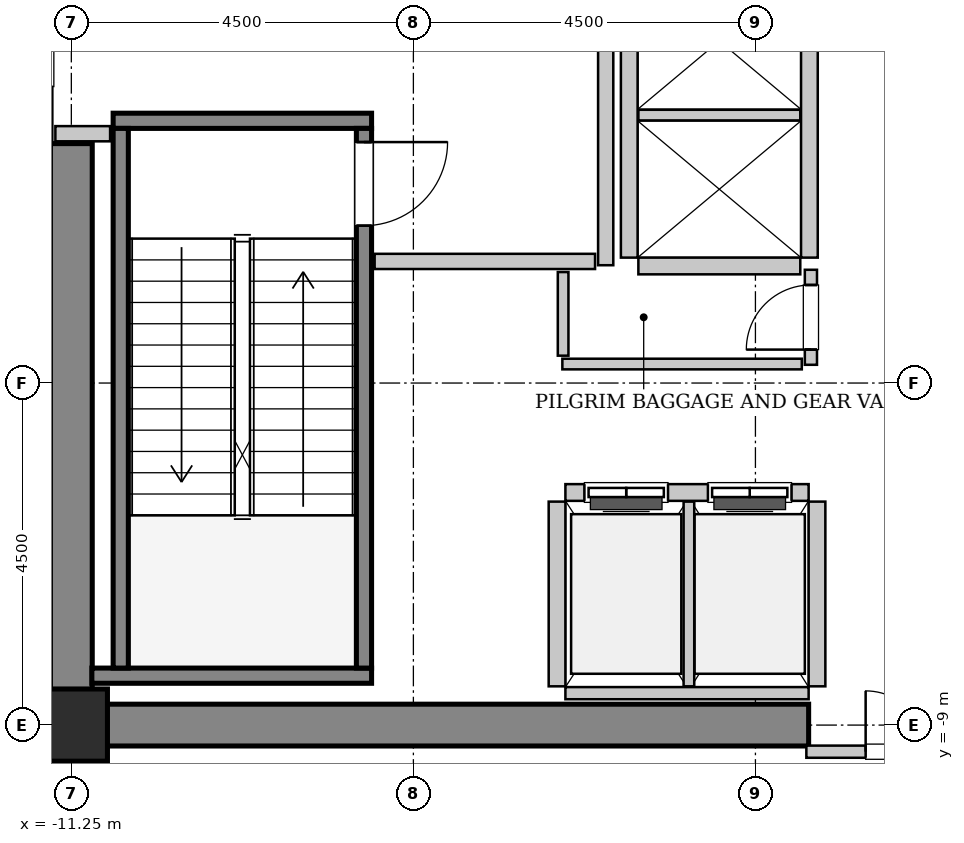
"""IFC4 building model, lengths in metres.
Left out: names, types, materials, properties, quantities, classifications, styles, units other than length and angle.
Written with IfcOpenShell. Run it as: python <this file> out.ifc"""

import sys

from ifc_helpers import new_model, si_unit, direction, frame, frame_2d, origin, origin_2d, place, context, subcontext, project, spatial, rectangle, hollow_rectangle, extrude, source, transform, mapped, element, fill, save


model = new_model("IFC4")
c1 = context("Model", 3, precision=1e-05, world=origin(), true_north=direction((0.0, 1.0)))
c2 = subcontext(c1, "Body", "Model", "MODEL_VIEW")
j1 = project(units=[si_unit("LENGTHUNIT", "METRE"), si_unit("PLANEANGLEUNIT", "RADIAN")], contexts=[c1])
p1 = place(None, origin())
s1 = spatial("IfcSite", under=j1, at=p1, CompositionType="ELEMENT")
p2 = place(p1, origin())
s2 = spatial("IfcBuilding", under=s1, at=p2, CompositionType="ELEMENT")
p3 = place(p2, frame((0.0, 0.0, 144.0)))
s3 = spatial("IfcBuildingStorey", under=s2, at=p3, CompositionType="ELEMENT", Elevation=144.0)
m1 = source(origin(), c2, "Body", "SweptSolid", [
    extrude(rectangle(XDim=9.975, YDim=0.55, at=frame_2d((4.987, 0.0))), origin(), (0.0, 0.0, 1.0), 4.8),
])
p4 = place(p3, frame((-11.525, -9.0, 0.0), z_axis=(0.0, 0.0, 1.0), x_axis=(1.0, 0.0, 0.0)))
e1 = element("IfcWall", 1, at=p4, inside=s3, PredefinedType="SHEAR", context=c2, shape_type="MappedRepresentation", body=[
    mapped(m1, transform((0.0, 0.0, 0.0), x_axis=(1.0, 0.0, 0.0), y_axis=(0.0, 1.0, 0.0), z_axis=(0.0, 0.0, 1.0), scale=1.0)),
])
m2 = source(origin(), c2, "Body", "SweptSolid", [
    extrude(rectangle(XDim=7.375, YDim=0.55, at=frame_2d((3.688, 0.0))), origin(), (0.0, 0.0, 1.0), 4.8),
])
p5 = place(p3, frame((-11.25, -8.725, 0.0), z_axis=(0.0, 0.0, 1.0), x_axis=(0.0, 1.0, 0.0)))
e2 = element("IfcWall", 2, at=p5, inside=s3, PredefinedType="SHEAR", context=c2, shape_type="MappedRepresentation", body=[
    mapped(m2, transform((0.0, 0.0, 0.0), x_axis=(1.0, 0.0, 0.0), y_axis=(0.0, 1.0, 0.0), z_axis=(0.0, 0.0, 1.0), scale=1.0)),
])
m3 = source(origin(), c2, "Body", "SweptSolid", [
    extrude(hollow_rectangle(XDim=0.95, YDim=0.95, WallThickness=0.045, InnerFilletRadius=0.045, OuterFilletRadius=0.09, at=origin_2d()), origin(), (0.0, 0.0, 1.0), 4.8),
])
p6 = place(p3, frame((-11.25, -9.0, 0.0), z_axis=(0.0, 0.0, 1.0), x_axis=(1.0, 0.0, 0.0)))
e3 = element("IfcColumn", 3, at=p6, inside=s3, PredefinedType="COLUMN", context=c2, shape_type="MappedRepresentation", body=[
    mapped(m3, transform((0.0, 0.0, 0.0), x_axis=(1.0, 0.0, 0.0), y_axis=(0.0, 1.0, 0.0), z_axis=(0.0, 0.0, 1.0), scale=1.0)),
])
m4 = source(origin(), c2, "Body", "SweptSolid", [
    extrude(rectangle(XDim=3.4, YDim=0.2, at=frame_2d((1.7, 0.0))), origin(), (0.0, 0.0, 1.0), 4.8),
])
p7 = place(p3, frame((-10.7, -1.05, 0.0), z_axis=(0.0, 0.0, 1.0), x_axis=(1.0, 0.0, 0.0)))
e4 = element("IfcWall", 4, at=p7, inside=s3, PredefinedType="SOLIDWALL", context=c2, shape_type="MappedRepresentation", body=[
    mapped(m4, transform((0.0, 0.0, 0.0), x_axis=(1.0, 0.0, 0.0), y_axis=(0.0, 1.0, 0.0), z_axis=(0.0, 0.0, 1.0), scale=1.0)),
])
m5 = source(origin(), c2, "Body", "SweptSolid", [
    extrude(rectangle(XDim=3.68, YDim=0.2, at=frame_2d((1.84, 0.0))), origin(), (0.0, 0.0, 1.0), 4.8),
])
p8 = place(p3, frame((-10.98, -8.35, 0.0), z_axis=(0.0, 0.0, 1.0), x_axis=(1.0, 0.0, 0.0)))
e5 = element("IfcWall", 5, at=p8, inside=s3, PredefinedType="SOLIDWALL", context=c2, shape_type="MappedRepresentation", body=[
    mapped(m5, transform((0.0, 0.0, 0.0), x_axis=(1.0, 0.0, 0.0), y_axis=(0.0, 1.0, 0.0), z_axis=(0.0, 0.0, 1.0), scale=1.0)),
])
m6 = source(origin(), c2, "Body", "SweptSolid", [
    extrude(rectangle(XDim=7.1, YDim=0.2, at=frame_2d((3.55, 0.0))), origin(), (0.0, 0.0, 1.0), 4.8),
])
p9 = place(p3, frame((-10.6, -1.15, 0.0), z_axis=(0.0, 0.0, 1.0), x_axis=(0.0, -1.0, 0.0)))
e6 = element("IfcWall", 6, at=p9, inside=s3, PredefinedType="SOLIDWALL", context=c2, shape_type="MappedRepresentation", body=[
    mapped(m6, transform((0.0, 0.0, 0.0), x_axis=(1.0, 0.0, 0.0), y_axis=(0.0, 1.0, 0.0), z_axis=(0.0, 0.0, 1.0), scale=1.0)),
])
p10 = place(p3, frame((-7.4, -1.15, 0.0), z_axis=(0.0, 0.0, 1.0), x_axis=(0.0, -1.0, 0.0)))
e7 = element("IfcWall", 7, at=p10, inside=s3, PredefinedType="SOLIDWALL", context=c2, shape_type="MappedRepresentation", body=[
    mapped(m6, transform((0.0, 0.0, 0.0), x_axis=(1.0, 0.0, 0.0), y_axis=(0.0, 1.0, 0.0), z_axis=(0.0, 0.0, 1.0), scale=1.0)),
])
p11 = place(p10, frame((0.18, 0.0, 0.0)))
e8 = element("IfcOpeningElement", 8, at=p11, cuts=e7, PredefinedType="OPENING", context=c2, shape_type="SweptSolid", body=[
    extrude(rectangle(XDim=1.1, YDim=2.15, at=frame_2d((0.55, 1.075))), frame((0.0, 0.11, 0.0), z_axis=(0.0, -1.0, 0.0), x_axis=(1.0, 0.0, 0.0)), (0.0, 0.0, 1.0), 0.22),
])
m7 = source(origin(), c2, "Body", "SweptSolid", [
    extrude(rectangle(XDim=3.2, YDim=0.22, at=frame_2d((1.6, 0.0))), origin(), (0.0, 0.0, 1.0), 4.535),
])
p12 = place(p3, frame((-1.55, -5.94, 0.0), z_axis=(0.0, 0.0, 1.0), x_axis=(-1.0, 0.0, 0.0)))
e9 = element("IfcWall", 9, at=p12, inside=s3, PredefinedType="SOLIDWALL", context=c2, shape_type="MappedRepresentation", body=[
    mapped(m7, transform((0.0, 0.0, 0.0), x_axis=(1.0, 0.0, 0.0), y_axis=(0.0, 1.0, 0.0), z_axis=(0.0, 0.0, 1.0), scale=1.0)),
])
p13 = place(p12, frame((1.85, 0.0, 0.0)))
e10 = element("IfcOpeningElement", 10, at=p13, cuts=e9, PredefinedType="OPENING", context=c2, shape_type="SweptSolid", body=[
    extrude(rectangle(XDim=1.1, YDim=2.2, at=frame_2d((0.55, 1.1))), frame((0.0, 0.12, 0.0), z_axis=(0.0, -1.0, 0.0), x_axis=(1.0, 0.0, 0.0)), (0.0, 0.0, 1.0), 0.24),
])
p14 = place(p12, frame((0.225, 0.0, 0.0)))
e11 = element("IfcOpeningElement", 11, at=p14, cuts=e9, PredefinedType="OPENING", context=c2, shape_type="SweptSolid", body=[
    extrude(rectangle(XDim=1.1, YDim=2.2, at=frame_2d((0.55, 1.1))), frame((0.0, 0.12, 0.0), z_axis=(0.0, -1.0, 0.0), x_axis=(1.0, 0.0, 0.0)), (0.0, 0.0, 1.0), 0.24),
])
m8 = source(origin(), c2, "Body", "SweptSolid", [
    extrude(rectangle(XDim=3.2, YDim=0.16, at=frame_2d((1.6, 0.0))), origin(), (0.0, 0.0, 1.0), 3.425),
])
p15 = place(p3, frame((-4.75, -8.58, 0.0), z_axis=(0.0, 0.0, 1.0), x_axis=(1.0, 0.0, 0.0)))
e12 = element("IfcWall", 12, at=p15, inside=s3, PredefinedType="PARTITIONING", context=c2, shape_type="MappedRepresentation", body=[
    mapped(m8, transform((0.0, 0.0, 0.0), x_axis=(1.0, 0.0, 0.0), y_axis=(0.0, 1.0, 0.0), z_axis=(0.0, 0.0, 1.0), scale=1.0)),
])
m9 = source(origin(), c2, "Body", "SweptSolid", [
    extrude(rectangle(XDim=2.43, YDim=0.22, at=frame_2d((1.215, 0.0))), origin(), (0.0, 0.0, 1.0), 4.535),
])
p16 = place(p3, frame((-4.86, -6.06, 0.0), z_axis=(0.0, 0.0, 1.0), x_axis=(0.0, -1.0, 0.0)))
e13 = element("IfcWall", 13, at=p16, inside=s3, PredefinedType="SOLIDWALL", context=c2, shape_type="MappedRepresentation", body=[
    mapped(m9, transform((0.0, 0.0, 0.0), x_axis=(1.0, 0.0, 0.0), y_axis=(0.0, 1.0, 0.0), z_axis=(0.0, 0.0, 1.0), scale=1.0)),
])
m10 = source(origin(), c2, "Body", "SweptSolid", [
    extrude(rectangle(XDim=2.43, YDim=0.14, at=frame_2d((1.215, 0.0))), origin(), (0.0, 0.0, 1.0), 4.535),
])
p17 = place(p3, frame((-3.125, -8.49, 0.0), z_axis=(0.0, 0.0, 1.0), x_axis=(0.0, 1.0, 0.0)))
e14 = element("IfcWall", 14, at=p17, inside=s3, PredefinedType="PARTITIONING", context=c2, shape_type="MappedRepresentation", body=[
    mapped(m10, transform((0.0, 0.0, 0.0), x_axis=(1.0, 0.0, 0.0), y_axis=(0.0, 1.0, 0.0), z_axis=(0.0, 0.0, 1.0), scale=1.0)),
])
p18 = place(p3, frame((-1.44, -8.49, 0.0), z_axis=(0.0, 0.0, 1.0), x_axis=(0.0, 1.0, 0.0)))
e15 = element("IfcWall", 15, at=p18, inside=s3, PredefinedType="SOLIDWALL", context=c2, shape_type="MappedRepresentation", body=[
    mapped(m9, transform((0.0, 0.0, 0.0), x_axis=(1.0, 0.0, 0.0), y_axis=(0.0, 1.0, 0.0), z_axis=(0.0, 0.0, 1.0), scale=1.0)),
])
m11 = source(origin(), c2, "Body", "SweptSolid", [
    extrude(rectangle(XDim=5.7, YDim=0.22, at=frame_2d((2.85, 0.0))), origin(), (0.0, 0.0, 1.0), 4.535),
])
for number, where, z_axis, x_axis in (
    (16, (-1.54, -2.85, 0.0), (0.0, 0.0, 1.0), (0.0, 1.0, 0.0)),
    (17, (-3.91, 2.85, 0.0), (0.0, 0.0, 1.0), (0.0, -1.0, 0.0)),
):
    element("IfcWall", number, at=place(p3, frame(where, z_axis=z_axis, x_axis=x_axis)), inside=s3, PredefinedType="SOLIDWALL", context=c2, shape_type="MappedRepresentation", body=[
        mapped(m11, transform((0.0, 0.0, 0.0), x_axis=(1.0, 0.0, 0.0), y_axis=(0.0, 1.0, 0.0), z_axis=(0.0, 0.0, 1.0), scale=1.0)),
    ])
m12 = source(origin(), c2, "Body", "SweptSolid", [
    extrude(rectangle(XDim=2.13, YDim=0.22, at=frame_2d((1.065, 0.0))), origin(), (0.0, 0.0, 1.0), 4.535),
])
p19 = place(p3, frame((-3.79, -2.96, 0.0), z_axis=(0.0, 0.0, 1.0), x_axis=(1.0, 0.0, 0.0)))
e18 = element("IfcWall", 18, at=p19, inside=s3, PredefinedType="SOLIDWALL", context=c2, shape_type="MappedRepresentation", body=[
    mapped(m12, transform((0.0, 0.0, 0.0), x_axis=(1.0, 0.0, 0.0), y_axis=(0.0, 1.0, 0.0), z_axis=(0.0, 0.0, 1.0), scale=1.0)),
])
m13 = source(origin(), c2, "Body", "SweptSolid", [
    extrude(rectangle(XDim=2.13, YDim=0.14, at=frame_2d((1.065, 0.0))), origin(), (0.0, 0.0, 1.0), 4.535),
])
p20 = place(p3, frame((-3.79, -0.975, 0.0), z_axis=(0.0, 0.0, 1.0), x_axis=(1.0, 0.0, 0.0)))
e19 = element("IfcWall", 19, at=p20, inside=s3, PredefinedType="PARTITIONING", context=c2, shape_type="MappedRepresentation", body=[
    mapped(m13, transform((0.0, 0.0, 0.0), x_axis=(1.0, 0.0, 0.0), y_axis=(0.0, 1.0, 0.0), z_axis=(0.0, 0.0, 1.0), scale=1.0)),
])
m14 = source(origin(), c2, "Body", "SweptSolid", [
    extrude(rectangle(XDim=5.9, YDim=0.2, at=frame_2d((2.95, 0.0))), origin(), (0.0, 0.0, 1.0), 4.535),
])
p21 = place(p3, frame((-4.22, -2.95, 0.0), z_axis=(0.0, 0.0, 1.0), x_axis=(0.0, 1.0, 0.0)))
e20 = element("IfcWall", 20, at=p21, inside=s3, PredefinedType="PARTITIONING", context=c2, shape_type="MappedRepresentation", body=[
    mapped(m14, transform((0.0, 0.0, 0.0), x_axis=(1.0, 0.0, 0.0), y_axis=(0.0, 1.0, 0.0), z_axis=(0.0, 0.0, 1.0), scale=1.0)),
])
m15 = source(origin(), c2, "Body", "SweptSolid", [
    extrude(rectangle(XDim=2.9, YDim=0.2, at=frame_2d((1.45, 0.0))), origin(), (0.0, 0.0, 1.0), 4.535),
])
p22 = place(p3, frame((-7.26, -2.9, 0.0), z_axis=(0.0, 0.0, 1.0), x_axis=(1.0, 0.0, 0.0)))
e21 = element("IfcWall", 21, at=p22, inside=s3, PredefinedType="PARTITIONING", context=c2, shape_type="MappedRepresentation", body=[
    mapped(m15, transform((0.0, 0.0, 0.0), x_axis=(1.0, 0.0, 0.0), y_axis=(0.0, 1.0, 0.0), z_axis=(0.0, 0.0, 1.0), scale=1.0)),
])
m16 = source(origin(), c2, "Body", "SweptSolid", [
    extrude(rectangle(XDim=0.72, YDim=0.2, at=frame_2d((0.36, 0.0))), origin(), (0.0, 0.0, 1.0), 4.535),
])
p23 = place(p3, frame((-11.46, -1.22, 0.0), z_axis=(0.0, 0.0, 1.0), x_axis=(1.0, 0.0, 0.0)))
e22 = element("IfcWall", 22, at=p23, inside=s3, PredefinedType="PARTITIONING", context=c2, shape_type="MappedRepresentation", body=[
    mapped(m16, transform((0.0, 0.0, 0.0), x_axis=(1.0, 0.0, 0.0), y_axis=(0.0, 1.0, 0.0), z_axis=(0.0, 0.0, 1.0), scale=1.0)),
])
m17 = source(origin(), c2, "Body", "SweptSolid", [
    extrude(rectangle(XDim=3.16, YDim=0.16, at=frame_2d((1.58, 0.0))), origin(), (0.0, 0.0, 1.0), 3.425),
])
p24 = place(p3, frame((-1.58, -9.35, 0.0), z_axis=(0.0, 0.0, 1.0), x_axis=(1.0, 0.0, 0.0)))
e23 = element("IfcWall", 23, at=p24, inside=s3, PredefinedType="PARTITIONING", context=c2, shape_type="MappedRepresentation", body=[
    mapped(m17, transform((0.0, 0.0, 0.0), x_axis=(1.0, 0.0, 0.0), y_axis=(0.0, 1.0, 0.0), z_axis=(0.0, 0.0, 1.0), scale=1.0)),
])
p25 = place(p24, frame((0.78, 0.0, 0.0)))
e24 = element("IfcOpeningElement", 24, at=p25, cuts=e23, PredefinedType="OPENING", context=c2, shape_type="SweptSolid", body=[
    extrude(rectangle(XDim=1.6, YDim=2.3, at=frame_2d((0.8, 1.15))), frame((0.0, 0.09, 0.0), z_axis=(0.0, -1.0, 0.0), x_axis=(1.0, 0.0, 0.0)), (0.0, 0.0, 1.0), 0.18),
])
m18 = source(origin(), c2, "Body", "SweptSolid", [
    extrude(rectangle(XDim=1.25, YDim=0.16, at=frame_2d((0.625, 0.0))), origin(), (0.0, 0.0, 1.0), 4.535),
])
p26 = place(p3, frame((-1.52, -4.26, 0.0), z_axis=(0.0, 0.0, 1.0), x_axis=(0.0, 1.0, 0.0)))
e25 = element("IfcWall", 25, at=p26, inside=s3, PredefinedType="PARTITIONING", context=c2, shape_type="MappedRepresentation", body=[
    mapped(m18, transform((0.0, 0.0, 0.0), x_axis=(1.0, 0.0, 0.0), y_axis=(0.0, 1.0, 0.0), z_axis=(0.0, 0.0, 1.0), scale=1.0)),
])
p27 = place(p26, frame((0.2, 0.0, 0.0)))
e26 = element("IfcOpeningElement", 26, at=p27, cuts=e25, PredefinedType="OPENING", context=c2, shape_type="SweptSolid", body=[
    extrude(rectangle(XDim=0.85, YDim=2.1, at=frame_2d((0.425, 1.05))), frame((0.0, 0.09, 0.0), z_axis=(0.0, -1.0, 0.0), x_axis=(1.0, 0.0, 0.0)), (0.0, 0.0, 1.0), 0.18),
])
m19 = source(origin(), c2, "Body", "SweptSolid", [
    extrude(rectangle(XDim=3.15, YDim=0.14, at=frame_2d((1.575, 0.0))), origin(), (0.0, 0.0, 1.0), 4.535),
])
p28 = place(p3, frame((-4.79, -4.25, 0.0), z_axis=(0.0, 0.0, 1.0), x_axis=(1.0, 0.0, 0.0)))
e27 = element("IfcWall", 27, at=p28, inside=s3, PredefinedType="PARTITIONING", context=c2, shape_type="MappedRepresentation", body=[
    mapped(m19, transform((0.0, 0.0, 0.0), x_axis=(1.0, 0.0, 0.0), y_axis=(0.0, 1.0, 0.0), z_axis=(0.0, 0.0, 1.0), scale=1.0)),
])
m20 = source(origin(), c2, "Body", "SweptSolid", [
    extrude(rectangle(XDim=1.1, YDim=0.14, at=frame_2d((0.55, 0.0))), origin(), (0.0, 0.0, 1.0), 4.535),
])
p29 = place(p3, frame((-4.78, -4.14, 0.0), z_axis=(0.0, 0.0, 1.0), x_axis=(0.0, 1.0, 0.0)))
e28 = element("IfcWall", 28, at=p29, inside=s3, PredefinedType="PARTITIONING", context=c2, shape_type="MappedRepresentation", body=[
    mapped(m20, transform((0.0, 0.0, 0.0), x_axis=(1.0, 0.0, 0.0), y_axis=(0.0, 1.0, 0.0), z_axis=(0.0, 0.0, 1.0), scale=1.0)),
])
m21 = source(origin(), c2, "Body", "SweptSolid", [
    extrude(rectangle(XDim=1.1, YDim=2.15, at=frame_2d((0.55, 1.075))), frame((0.0, 0.025, 0.0), z_axis=(0.0, -1.0, 0.0), x_axis=(1.0, 0.0, 0.0)), (0.0, 0.0, 1.0), 0.05),
])
p30 = place(p11, origin())
e29 = element("IfcDoor", 29, at=p30, inside=s3, OperationType="SINGLE_SWING_LEFT", PredefinedType="DOOR", context=c2, shape_type="MappedRepresentation", body=[
    mapped(m21, transform((0.0, 0.0, 0.0), x_axis=(1.0, 0.0, 0.0), y_axis=(0.0, 1.0, 0.0), z_axis=(0.0, 0.0, 1.0), scale=1.0)),
])
fill(e8, e29)
m22 = source(origin(), c2, "Body", "SweptSolid", [
    extrude(rectangle(XDim=1.1, YDim=2.2, at=frame_2d((0.55, 1.1))), frame((0.0, 0.025, 0.0), z_axis=(0.0, -1.0, 0.0), x_axis=(1.0, 0.0, 0.0)), (0.0, 0.0, 1.0), 0.05),
])
p31 = place(p13, origin())
e30 = element("IfcDoor", 30, at=p31, inside=s3, OperationType="DOUBLE_DOOR_SLIDING", PredefinedType="DOOR", context=c2, shape_type="MappedRepresentation", body=[
    mapped(m22, transform((0.0, 0.0, 0.0), x_axis=(1.0, 0.0, 0.0), y_axis=(0.0, 1.0, 0.0), z_axis=(0.0, 0.0, 1.0), scale=1.0)),
])
fill(e10, e30)
p32 = place(p14, origin())
e31 = element("IfcDoor", 31, at=p32, inside=s3, OperationType="DOUBLE_DOOR_SLIDING", PredefinedType="DOOR", context=c2, shape_type="MappedRepresentation", body=[
    mapped(m22, transform((0.0, 0.0, 0.0), x_axis=(1.0, 0.0, 0.0), y_axis=(0.0, 1.0, 0.0), z_axis=(0.0, 0.0, 1.0), scale=1.0)),
])
fill(e11, e31)
m23 = source(origin(), c2, "Body", "SweptSolid", [
    extrude(rectangle(XDim=1.6, YDim=2.3, at=frame_2d((0.8, 1.15))), frame((0.0, 0.025, 0.0), z_axis=(0.0, -1.0, 0.0), x_axis=(1.0, 0.0, 0.0)), (0.0, 0.0, 1.0), 0.05),
])
p33 = place(p25, origin())
e32 = element("IfcDoor", 32, at=p33, inside=s3, OperationType="DOUBLE_DOOR_SINGLE_SWING", PredefinedType="DOOR", context=c2, shape_type="MappedRepresentation", body=[
    mapped(m23, transform((0.0, 0.0, 0.0), x_axis=(1.0, 0.0, 0.0), y_axis=(0.0, 1.0, 0.0), z_axis=(0.0, 0.0, 1.0), scale=1.0)),
])
fill(e24, e32)
m24 = source(origin(), c2, "Body", "SweptSolid", [
    extrude(rectangle(XDim=0.85, YDim=2.1, at=frame_2d((0.425, 1.05))), frame((0.0, 0.025, 0.0), z_axis=(0.0, -1.0, 0.0), x_axis=(1.0, 0.0, 0.0)), (0.0, 0.0, 1.0), 0.05),
])
p34 = place(p27, origin())
e33 = element("IfcDoor", 33, at=p34, inside=s3, OperationType="SINGLE_SWING_LEFT", PredefinedType="DOOR", context=c2, shape_type="MappedRepresentation", body=[
    mapped(m24, transform((0.0, 0.0, 0.0), x_axis=(1.0, 0.0, 0.0), y_axis=(0.0, 1.0, 0.0), z_axis=(0.0, 0.0, 1.0), scale=1.0)),
])
fill(e26, e33)
save(model, sys.argv[1])
